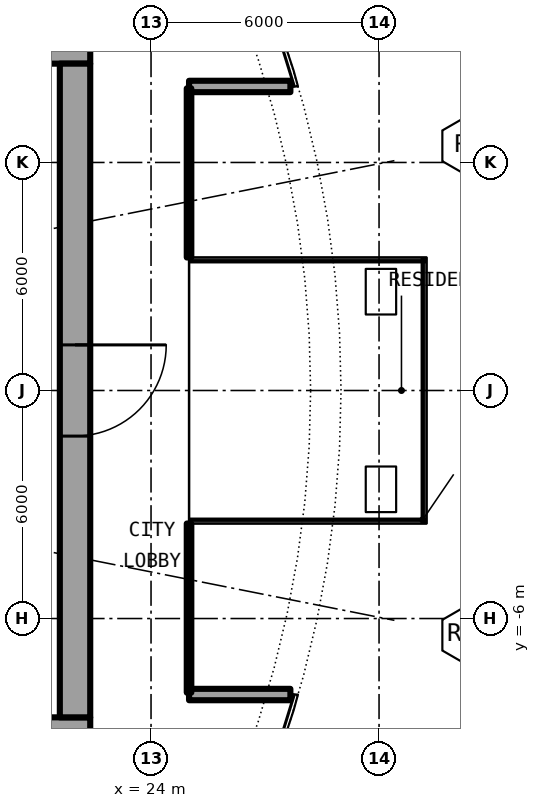
"""IFC4 building model, lengths in metres.
Left out: names, types, materials, properties, quantities, classifications, styles, units other than length and angle.
Written with IfcOpenShell. Run it as: python <this file> out.ifc"""

import sys

from ifc_helpers import new_model, si_unit, direction, frame, frame_2d, origin, place, context, subcontext, project, spatial, rectangle, extrude, element, fill, save


model = new_model("IFC4")
c1 = context("Model", 3, precision=1e-05, world=origin(), true_north=direction((0.0, 1.0)))
c2 = subcontext(c1, "Body", "Model", "MODEL_VIEW")
j1 = project(units=[si_unit("LENGTHUNIT", "METRE"), si_unit("PLANEANGLEUNIT", "RADIAN")], contexts=[c1])
p1 = place(None, origin())
s1 = spatial("IfcSite", under=j1, at=p1, CompositionType="ELEMENT")
p2 = place(p1, origin())
s2 = spatial("IfcBuilding", under=s1, at=p2, CompositionType="ELEMENT")
p3 = place(p2, frame((0.0, 0.0, 57.5)))
s3 = spatial("IfcBuildingStorey", under=s2, at=p3, CompositionType="ELEMENT", Elevation=57.5)
for number, where, z_axis, x_axis in (
    (1, (25.0, 8.0, 0.0), (0.0, 0.0, 1.0), (1.0, 0.0, 0.0)),
    (2, (25.0, -8.0, 0.0), (0.0, 0.0, 1.0), (1.0, 0.0, 0.0)),
):
    element("IfcWall", number, at=place(p3, frame(where, z_axis=z_axis, x_axis=x_axis)), inside=s3, PredefinedType="SOLIDWALL", context=c2, shape_type="SweptSolid", body=[
        extrude(rectangle(XDim=2.667, YDim=0.3, at=frame_2d((1.333, 0.0))), origin(), (0.0, 0.0, 1.0), 5.75),
    ])
p4 = place(p3, frame((22.4, 9.0, 0.0), z_axis=(0.0, 0.0, 1.0), x_axis=(-1.0, 0.0, 0.0)))
e3 = element("IfcWall", 3, at=p4, inside=s3, PredefinedType="SHEAR", context=c2, shape_type="SweptSolid", body=[
    extrude(rectangle(XDim=14.2, YDim=0.8, at=frame_2d((7.1, 0.0))), origin(), (0.0, 0.0, 1.0), 6.1),
])
p5 = place(p4, frame((1.325, 0.0, 0.0)))
e4 = element("IfcOpeningElement", 4, at=p5, cuts=e3, PredefinedType="OPENING", context=c2, shape_type="SweptSolid", body=[
    extrude(rectangle(XDim=1.2, YDim=2.3, at=frame_2d((0.6, 1.15))), frame((0.0, 0.41, 0.0), z_axis=(0.0, -1.0, 0.0), x_axis=(1.0, 0.0, 0.0)), (0.0, 0.0, 1.0), 0.82),
])
p6 = place(p3, frame((8.2, -9.0, 0.0), z_axis=(0.0, 0.0, 1.0), x_axis=(1.0, 0.0, 0.0)))
e5 = element("IfcWall", 5, at=p6, inside=s3, PredefinedType="SHEAR", context=c2, shape_type="SweptSolid", body=[
    extrude(rectangle(XDim=14.2, YDim=0.8, at=frame_2d((7.1, 0.0))), origin(), (0.0, 0.0, 1.0), 6.1),
])
p7 = place(p6, frame((11.675, 0.0, 0.0)))
e6 = element("IfcOpeningElement", 6, at=p7, cuts=e5, PredefinedType="OPENING", context=c2, shape_type="SweptSolid", body=[
    extrude(rectangle(XDim=1.2, YDim=2.3, at=frame_2d((0.6, 1.15))), frame((0.0, 0.41, 0.0), z_axis=(0.0, -1.0, 0.0), x_axis=(1.0, 0.0, 0.0)), (0.0, 0.0, 1.0), 0.82),
])
p8 = place(p3, frame((22.0, 8.6, 0.0), z_axis=(0.0, 0.0, 1.0), x_axis=(0.0, -1.0, 0.0)))
e7 = element("IfcWall", 7, at=p8, inside=s3, PredefinedType="SHEAR", context=c2, shape_type="SweptSolid", body=[
    extrude(rectangle(XDim=17.2, YDim=0.8, at=frame_2d((8.6, 0.0))), origin(), (0.0, 0.0, 1.0), 6.1),
])
p9 = place(p8, frame((7.4, 0.0, 0.0)))
e8 = element("IfcOpeningElement", 8, at=p9, cuts=e7, PredefinedType="OPENING", context=c2, shape_type="SweptSolid", body=[
    extrude(rectangle(XDim=2.4, YDim=2.3, at=frame_2d((1.2, 1.15))), frame((0.0, 0.41, 0.0), z_axis=(0.0, -1.0, 0.0), x_axis=(1.0, 0.0, 0.0)), (0.0, 0.0, 1.0), 0.82),
])
p10 = place(p3, frame((25.0, -3.5, 0.0), z_axis=(0.0, 0.0, 1.0), x_axis=(0.0, -1.0, 0.0)))
e9 = element("IfcWall", 9, at=p10, inside=s3, PredefinedType="PARTITIONING", context=c2, shape_type="SweptSolid", body=[
    extrude(rectangle(XDim=4.45, YDim=0.12, at=frame_2d((2.225, 0.0))), origin(), (0.0, 0.0, 1.0), 5.75),
])
p11 = place(p10, frame((0.4, 0.0, 0.1)))
e10 = element("IfcOpeningElement", 10, at=p11, cuts=e9, PredefinedType="OPENING", context=c2, shape_type="SweptSolid", body=[
    extrude(rectangle(XDim=3.6, YDim=5.4, at=frame_2d((1.8, 2.7))), frame((0.0, 0.07, 0.0), z_axis=(0.0, -1.0, 0.0), x_axis=(1.0, 0.0, 0.0)), (0.0, 0.0, 1.0), 0.14),
])
p12 = place(p3, frame((25.0, 3.5, 0.0), z_axis=(0.0, 0.0, 1.0), x_axis=(0.0, 1.0, 0.0)))
e11 = element("IfcWall", 11, at=p12, inside=s3, PredefinedType="PARTITIONING", context=c2, shape_type="SweptSolid", body=[
    extrude(rectangle(XDim=4.45, YDim=0.12, at=frame_2d((2.225, 0.0))), origin(), (0.0, 0.0, 1.0), 5.75),
])
p13 = place(p12, frame((0.4, 0.0, 0.1)))
e12 = element("IfcOpeningElement", 12, at=p13, cuts=e11, PredefinedType="OPENING", context=c2, shape_type="SweptSolid", body=[
    extrude(rectangle(XDim=3.6, YDim=5.4, at=frame_2d((1.8, 2.7))), frame((0.0, 0.07, 0.0), z_axis=(0.0, -1.0, 0.0), x_axis=(1.0, 0.0, 0.0)), (0.0, 0.0, 1.0), 0.14),
])
p14 = place(p9, origin())
e13 = element("IfcDoor", 13, at=p14, inside=s3, OperationType="SINGLE_SWING_LEFT", PredefinedType="DOOR", context=c2, shape_type="SweptSolid", body=[
    extrude(rectangle(XDim=2.4, YDim=2.3, at=frame_2d((1.2, 1.15))), frame((0.0, 0.025, 0.0), z_axis=(0.0, -1.0, 0.0), x_axis=(1.0, 0.0, 0.0)), (0.0, 0.0, 1.0), 0.05),
])
fill(e8, e13)
p15 = place(p11, origin())
e14 = element("IfcWindow", 14, at=p15, inside=s3, PartitioningType="SINGLE_PANEL", PredefinedType="WINDOW", context=c2, shape_type="SweptSolid", body=[
    extrude(rectangle(XDim=3.6, YDim=5.4, at=frame_2d((1.8, 2.7))), frame((0.0, 0.03, 0.0), z_axis=(0.0, -1.0, 0.0), x_axis=(1.0, 0.0, 0.0)), (0.0, 0.0, 1.0), 0.06),
])
fill(e10, e14)
p16 = place(p13, origin())
e15 = element("IfcWindow", 15, at=p16, inside=s3, PartitioningType="SINGLE_PANEL", PredefinedType="WINDOW", context=c2, shape_type="SweptSolid", body=[
    extrude(rectangle(XDim=3.6, YDim=5.4, at=frame_2d((1.8, 2.7))), frame((0.0, 0.03, 0.0), z_axis=(0.0, -1.0, 0.0), x_axis=(1.0, 0.0, 0.0)), (0.0, 0.0, 1.0), 0.06),
])
fill(e12, e15)
save(model, sys.argv[1])
